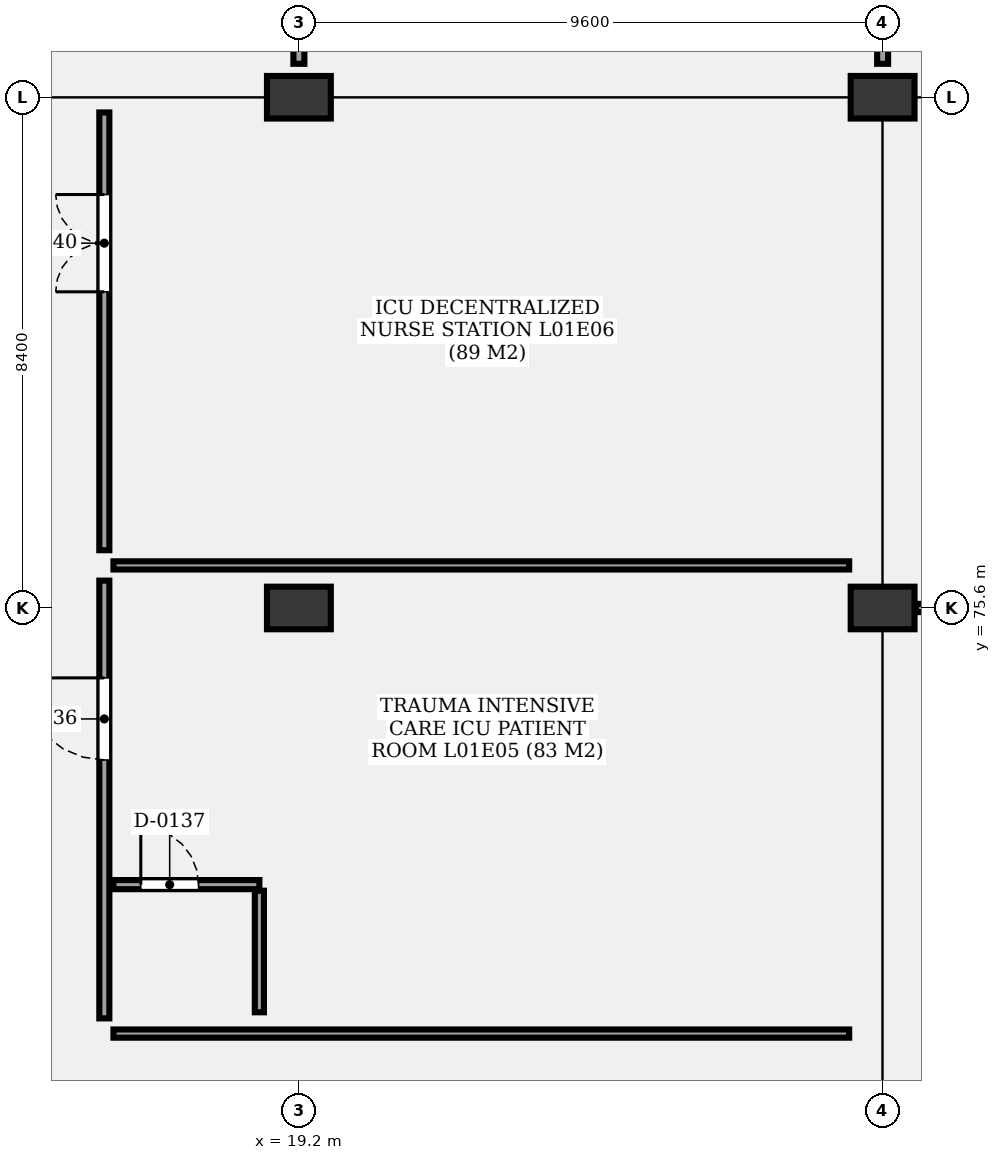
"""IFC4 building model, lengths in metres.
Left out: names, types, materials, properties, quantities, classifications, styles, units other than length and angle.
Written with IfcOpenShell. Run it as: python <this file> out.ifc"""

import sys

from ifc_helpers import new_model, si_unit, direction, frame, frame_2d, origin, origin_2d, place, context, subcontext, project, spatial, rectangle, extrude, element, fill, save


model = new_model("IFC4")
c1 = context("Model", 3, precision=1e-05, world=origin(), true_north=direction((0.0, 1.0)))
c2 = subcontext(c1, "Body", "Model", "MODEL_VIEW")
j1 = project(units=[si_unit("LENGTHUNIT", "METRE"), si_unit("PLANEANGLEUNIT", "RADIAN")], contexts=[c1])
p1 = place(None, origin())
s1 = spatial("IfcSite", under=j1, at=p1, CompositionType="ELEMENT")
p2 = place(p1, origin())
s2 = spatial("IfcBuilding", under=s1, at=p2, CompositionType="ELEMENT")
p3 = place(p2, frame((0.0, 0.0, 5.1)))
s3 = spatial("IfcBuildingStorey", under=s2, at=p3, CompositionType="ELEMENT", Elevation=5.1)
for number, where, z_axis, x_axis in (
    (1, (19.2, 75.6, 0.0), (0.0, 0.0, 1.0), (1.0, 0.0, 0.0)),
    (2, (19.2, 84.0, 0.0), (0.0, 0.0, 1.0), (1.0, 0.0, 0.0)),
    (3, (28.8, 75.6, 0.0), (0.0, 0.0, 1.0), (1.0, 0.0, 0.0)),
    (4, (28.8, 84.0, 0.0), (0.0, 0.0, 1.0), (1.0, 0.0, 0.0)),
):
    element("IfcColumn", number, at=place(p3, frame(where, z_axis=z_axis, x_axis=x_axis)), inside=s3, PredefinedType="COLUMN", context=c2, shape_type="SweptSolid", body=[
        extrude(rectangle(XDim=1.05, YDim=0.7, at=origin_2d()), origin(), (0.0, 0.0, 1.0), 4.8),
    ])
for number, where, z_axis, x_axis in (
    (5, (19.2, 84.55, 0.0), (0.0, 0.0, 1.0), (0.0, 1.0, 0.0)),
    (6, (28.8, 84.55, 0.0), (0.0, 0.0, 1.0), (0.0, 1.0, 0.0)),
):
    element("IfcWall", number, at=place(p3, frame(where, z_axis=z_axis, x_axis=x_axis)), inside=s3, PredefinedType="PARTITIONING", context=c2, shape_type="SweptSolid", body=[
        extrude(rectangle(XDim=17.3, YDim=0.18, at=frame_2d((8.65, 0.0))), origin(), (0.0, 0.0, 1.0), 3.68),
    ])
p4 = place(p3, frame((16.0, 68.85, 0.0), z_axis=(0.0, 0.0, 1.0), x_axis=(0.0, 1.0, 0.0)))
e7 = element("IfcWall", 7, at=p4, inside=s3, PredefinedType="PARTITIONING", context=c2, shape_type="SweptSolid", body=[
    extrude(rectangle(XDim=7.2, YDim=0.165, at=frame_2d((3.6, 0.0))), origin(), (0.0, 0.0, 1.0), 3.68),
])
p5 = place(p4, frame((4.25, 0.0, 0.0)))
e8 = element("IfcOpeningElement", 8, at=p5, cuts=e7, PredefinedType="OPENING", context=c2, shape_type="SweptSolid", body=[
    extrude(rectangle(XDim=1.35, YDim=2.4, at=frame_2d((0.675, 1.2))), frame((0.0, 0.093, 0.0), z_axis=(0.0, -1.0, 0.0), x_axis=(1.0, 0.0, 0.0)), (0.0, 0.0, 1.0), 0.185),
])
p6 = place(p3, frame((16.15, 71.05, 0.0), z_axis=(0.0, 0.0, 1.0), x_axis=(1.0, 0.0, 0.0)))
e9 = element("IfcWall", 9, at=p6, inside=s3, PredefinedType="PARTITIONING", context=c2, shape_type="SweptSolid", body=[
    extrude(rectangle(XDim=2.4, YDim=0.15, at=frame_2d((1.2, 0.0))), origin(), (0.0, 0.0, 1.0), 3.68),
])
p7 = place(p6, frame((0.45, 0.0, 0.0)))
e10 = element("IfcOpeningElement", 10, at=p7, cuts=e9, PredefinedType="OPENING", context=c2, shape_type="SweptSolid", body=[
    extrude(rectangle(XDim=0.95, YDim=2.1, at=frame_2d((0.475, 1.05))), frame((0.0, 0.085, 0.0), z_axis=(0.0, -1.0, 0.0), x_axis=(1.0, 0.0, 0.0)), (0.0, 0.0, 1.0), 0.17),
])
p8 = place(p3, frame((18.55, 68.95, 0.0), z_axis=(0.0, 0.0, 1.0), x_axis=(0.0, 1.0, 0.0)))
e11 = element("IfcWall", 11, at=p8, inside=s3, PredefinedType="PARTITIONING", context=c2, shape_type="SweptSolid", body=[
    extrude(rectangle(XDim=2.0, YDim=0.15, at=frame_2d((1.0, 0.0))), origin(), (0.0, 0.0, 1.0), 3.68),
])
p9 = place(p3, frame((16.15, 68.6, 0.0), z_axis=(0.0, 0.0, 1.0), x_axis=(1.0, 0.0, 0.0)))
e12 = element("IfcWall", 12, at=p9, inside=s3, PredefinedType="PARTITIONING", context=c2, shape_type="SweptSolid", body=[
    extrude(rectangle(XDim=12.1, YDim=0.135, at=frame_2d((6.05, 0.0))), origin(), (0.0, 0.0, 1.0), 3.68),
])
p10 = place(p3, frame((16.0, 76.55, 0.0), z_axis=(0.0, 0.0, 1.0), x_axis=(0.0, 1.0, 0.0)))
e13 = element("IfcWall", 13, at=p10, inside=s3, PredefinedType="PARTITIONING", context=c2, shape_type="SweptSolid", body=[
    extrude(rectangle(XDim=7.2, YDim=0.165, at=frame_2d((3.6, 0.0))), origin(), (0.0, 0.0, 1.0), 3.68),
])
p11 = place(p10, frame((4.25, 0.0, 0.0)))
e14 = element("IfcOpeningElement", 14, at=p11, cuts=e13, PredefinedType="OPENING", context=c2, shape_type="SweptSolid", body=[
    extrude(rectangle(XDim=1.6, YDim=2.2, at=frame_2d((0.8, 1.1))), frame((0.0, 0.093, 0.0), z_axis=(0.0, -1.0, 0.0), x_axis=(1.0, 0.0, 0.0)), (0.0, 0.0, 1.0), 0.185),
])
p12 = place(p3, frame((16.15, 76.3, 0.0), z_axis=(0.0, 0.0, 1.0), x_axis=(1.0, 0.0, 0.0)))
e15 = element("IfcWall", 15, at=p12, inside=s3, PredefinedType="PARTITIONING", context=c2, shape_type="SweptSolid", body=[
    extrude(rectangle(XDim=12.1, YDim=0.135, at=frame_2d((6.05, 0.0))), origin(), (0.0, 0.0, 1.0), 3.68),
])
p13 = place(p3, frame((29.35, 75.6, 0.0), z_axis=(0.0, 0.0, 1.0), x_axis=(1.0, 0.0, 0.0)))
e16 = element("IfcWall", 16, at=p13, inside=s3, PredefinedType="PARTITIONING", context=c2, shape_type="SweptSolid", body=[
    extrude(rectangle(XDim=12.1, YDim=0.135, at=frame_2d((6.05, 0.0))), origin(), (0.0, 0.0, 1.0), 3.68),
])
p14 = place(p5, origin())
e17 = element("IfcDoor", 17, at=p14, inside=s3, OperationType="SINGLE_SWING_RIGHT", PredefinedType="DOOR", context=c2, shape_type="SweptSolid", body=[
    extrude(rectangle(XDim=1.35, YDim=2.4, at=frame_2d((0.675, 1.2))), frame((0.0, 0.025, 0.0), z_axis=(0.0, -1.0, 0.0), x_axis=(1.0, 0.0, 0.0)), (0.0, 0.0, 1.0), 0.05),
])
fill(e8, e17)
p15 = place(p7, origin())
e18 = element("IfcDoor", 18, at=p15, inside=s3, OperationType="SINGLE_SWING_LEFT", PredefinedType="DOOR", context=c2, shape_type="SweptSolid", body=[
    extrude(rectangle(XDim=0.95, YDim=2.1, at=frame_2d((0.475, 1.05))), frame((0.0, 0.025, 0.0), z_axis=(0.0, -1.0, 0.0), x_axis=(1.0, 0.0, 0.0)), (0.0, 0.0, 1.0), 0.05),
])
fill(e10, e18)
p16 = place(p11, origin())
e19 = element("IfcDoor", 19, at=p16, inside=s3, OperationType="DOUBLE_DOOR_SINGLE_SWING", PredefinedType="DOOR", context=c2, shape_type="SweptSolid", body=[
    extrude(rectangle(XDim=1.6, YDim=2.2, at=frame_2d((0.8, 1.1))), frame((0.0, 0.025, 0.0), z_axis=(0.0, -1.0, 0.0), x_axis=(1.0, 0.0, 0.0)), (0.0, 0.0, 1.0), 0.05),
])
fill(e14, e19)
save(model, sys.argv[1])
